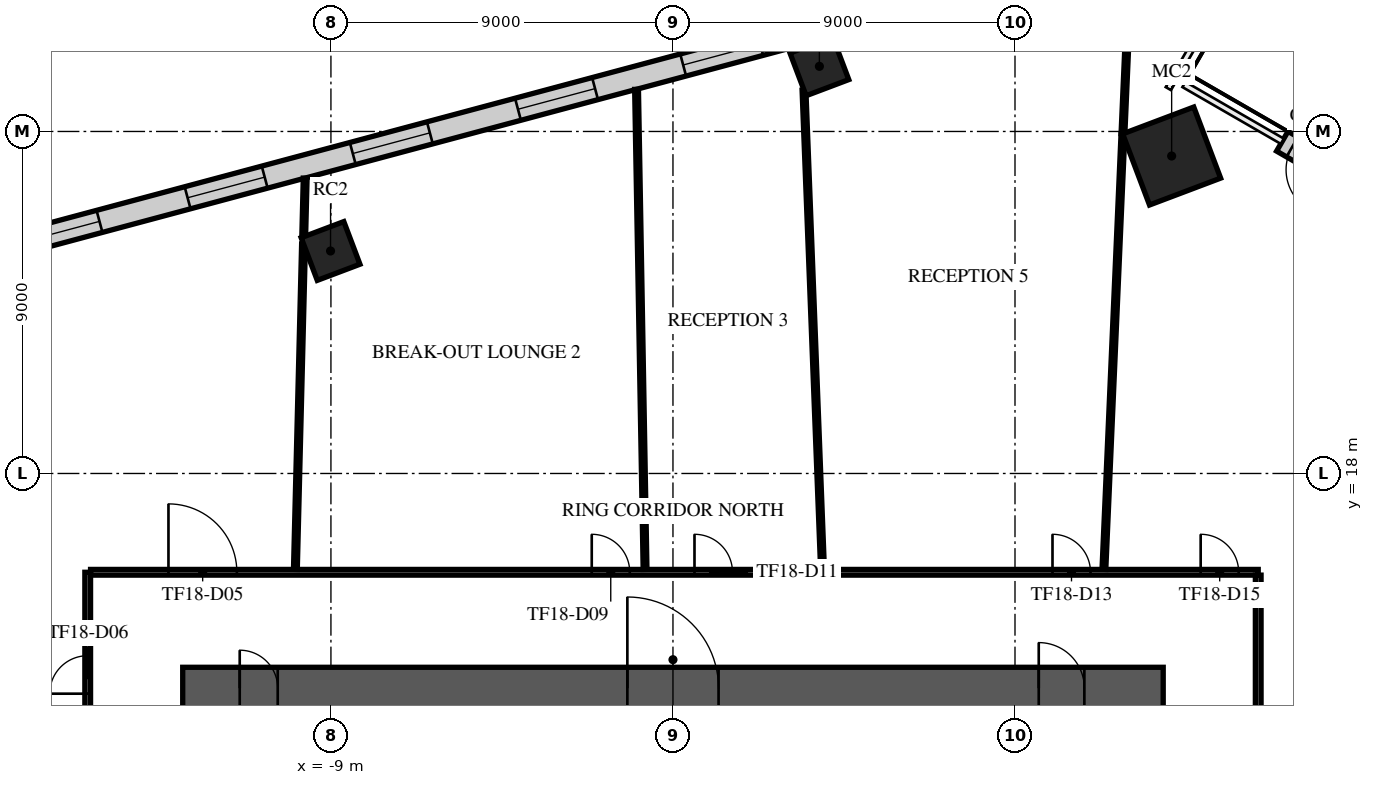
"""IFC4 building model, lengths in metres.
Left out: names, types, materials, properties, quantities, classifications, styles, units other than length and angle.
Written with IfcOpenShell. Run it as: python <this file> out.ifc"""

import sys

from ifc_helpers import new_model, si_unit, direction, frame, frame_2d, origin, origin_2d, place, context, subcontext, project, spatial, rectangle, extrude, element, fill, save


model = new_model("IFC4")
c1 = context("Model", 3, precision=1e-05, world=origin(), true_north=direction((0.0, 1.0)))
c2 = subcontext(c1, "Body", "Model", "MODEL_VIEW")
j1 = project(units=[si_unit("LENGTHUNIT", "METRE"), si_unit("PLANEANGLEUNIT", "RADIAN")], contexts=[c1])
p1 = place(None, origin())
s1 = spatial("IfcSite", under=j1, at=p1, CompositionType="ELEMENT")
p2 = place(p1, origin())
s2 = spatial("IfcBuilding", under=s1, at=p2, CompositionType="ELEMENT")
p3 = place(p2, frame((0.0, 0.0, 82.1)))
s3 = spatial("IfcBuildingStorey", under=s2, at=p3, CompositionType="ELEMENT", Elevation=82.1)
p4 = place(p3, frame((13.122, 26.354, -0.42), z_axis=(0.0, 0.0, 1.0), x_axis=(0.935491525991, 0.353349125935, 0.0)))
e1 = element("IfcColumn", 1, at=p4, inside=s3, PredefinedType="COLUMN", context=c2, shape_type="SweptSolid", body=[
    extrude(rectangle(XDim=2.0, YDim=2.0, at=origin_2d()), origin(), (0.0, 0.0, 1.0), 4.42),
])
for number, where, z_axis, x_axis in (
    (2, (3.853, 28.714, -0.42), (0.0, 0.0, 1.0), (0.935, 0.353, 0.0)),
    (3, (-9.01, 23.855, -0.42), (0.0, 0.0, 1.0), (0.935, 0.353, 0.0)),
):
    element("IfcColumn", number, at=place(p3, frame(where, z_axis=z_axis, x_axis=x_axis)), inside=s3, PredefinedType="COLUMN", context=c2, shape_type="SweptSolid", body=[
        extrude(rectangle(XDim=1.2, YDim=1.2, at=origin_2d()), origin(), (0.0, 0.0, 1.0), 4.42),
    ])
p5 = place(p3, frame((-12.9, 12.35, 0.0), z_axis=(0.0, 0.0, 1.0), x_axis=(1.0, 0.0, 0.0)))
e4 = element("IfcWall", 4, at=p5, inside=s3, PredefinedType="SHEAR", context=c2, shape_type="SweptSolid", body=[
    extrude(rectangle(XDim=25.8, YDim=1.1, at=frame_2d((12.9, 0.0))), origin(), (0.0, 0.0, 1.0), 3.58),
])
p6 = place(p5, frame((11.7, 0.0, 0.0)))
e5 = element("IfcOpeningElement", 5, at=p6, cuts=e4, PredefinedType="OPENING", context=c2, shape_type="SweptSolid", body=[
    extrude(rectangle(XDim=2.4, YDim=2.4, at=frame_2d((1.2, 1.2))), frame((0.0, 0.56, 0.0), z_axis=(0.0, -1.0, 0.0), x_axis=(1.0, 0.0, 0.0)), (0.0, 0.0, 1.0), 1.12),
])
p7 = place(p5, frame((22.525, 0.0, 0.0)))
e6 = element("IfcOpeningElement", 6, at=p7, cuts=e4, PredefinedType="OPENING", context=c2, shape_type="SweptSolid", body=[
    extrude(rectangle(XDim=1.2, YDim=2.1, at=frame_2d((0.6, 1.05))), frame((0.0, 0.56, 0.0), z_axis=(0.0, -1.0, 0.0), x_axis=(1.0, 0.0, 0.0)), (0.0, 0.0, 1.0), 1.12),
])
p8 = place(p5, frame((1.5, 0.0, 0.0)))
e7 = element("IfcOpeningElement", 7, at=p8, cuts=e4, PredefinedType="OPENING", context=c2, shape_type="SweptSolid", body=[
    extrude(rectangle(XDim=1.0, YDim=2.1, at=frame_2d((0.5, 1.05))), frame((0.0, 0.56, 0.0), z_axis=(0.0, -1.0, 0.0), x_axis=(1.0, 0.0, 0.0)), (0.0, 0.0, 1.0), 1.12),
])
p9 = place(p3, frame((16.496, 33.097, 0.0), z_axis=(0.0, 0.0, 1.0), x_axis=(-0.965926333894, -0.258817150689, 0.0)))
e8 = element("IfcWall", 8, at=p9, inside=s3, PredefinedType="STANDARD", context=c2, shape_type="SweptSolid", body=[
    extrude(rectangle(XDim=49.376, YDim=0.6, at=frame_2d((24.688, 0.0))), origin(), (0.0, 0.0, 1.0), 3.58),
])
p10 = place(p9, frame((1.2, 0.0, 0.9)))
e9 = element("IfcOpeningElement", 9, at=p10, cuts=e8, PredefinedType="OPENING", context=c2, shape_type="SweptSolid", body=[
    extrude(rectangle(XDim=2.1, YDim=2.1, at=frame_2d((1.05, 1.05))), frame((0.0, 0.31, 0.0), z_axis=(0.0, -1.0, 0.0), x_axis=(1.0, 0.0, 0.0)), (0.0, 0.0, 1.0), 0.62),
])
p11 = place(p9, frame((5.7, 0.0, 0.9)))
e10 = element("IfcOpeningElement", 10, at=p11, cuts=e8, PredefinedType="OPENING", context=c2, shape_type="SweptSolid", body=[
    extrude(rectangle(XDim=2.1, YDim=2.1, at=frame_2d((1.05, 1.05))), frame((0.0, 0.31, 0.0), z_axis=(0.0, -1.0, 0.0), x_axis=(1.0, 0.0, 0.0)), (0.0, 0.0, 1.0), 0.62),
])
p12 = place(p9, frame((10.2, 0.0, 0.9)))
e11 = element("IfcOpeningElement", 11, at=p12, cuts=e8, PredefinedType="OPENING", context=c2, shape_type="SweptSolid", body=[
    extrude(rectangle(XDim=2.1, YDim=2.1, at=frame_2d((1.05, 1.05))), frame((0.0, 0.31, 0.0), z_axis=(0.0, -1.0, 0.0), x_axis=(1.0, 0.0, 0.0)), (0.0, 0.0, 1.0), 0.62),
])
p13 = place(p9, frame((14.7, 0.0, 0.9)))
e12 = element("IfcOpeningElement", 12, at=p13, cuts=e8, PredefinedType="OPENING", context=c2, shape_type="SweptSolid", body=[
    extrude(rectangle(XDim=2.1, YDim=2.1, at=frame_2d((1.05, 1.05))), frame((0.0, 0.31, 0.0), z_axis=(0.0, -1.0, 0.0), x_axis=(1.0, 0.0, 0.0)), (0.0, 0.0, 1.0), 0.62),
])
p14 = place(p9, frame((19.2, 0.0, 0.9)))
e13 = element("IfcOpeningElement", 13, at=p14, cuts=e8, PredefinedType="OPENING", context=c2, shape_type="SweptSolid", body=[
    extrude(rectangle(XDim=2.1, YDim=2.1, at=frame_2d((1.05, 1.05))), frame((0.0, 0.31, 0.0), z_axis=(0.0, -1.0, 0.0), x_axis=(1.0, 0.0, 0.0)), (0.0, 0.0, 1.0), 0.62),
])
p15 = place(p9, frame((23.7, 0.0, 0.9)))
e14 = element("IfcOpeningElement", 14, at=p15, cuts=e8, PredefinedType="OPENING", context=c2, shape_type="SweptSolid", body=[
    extrude(rectangle(XDim=2.1, YDim=2.1, at=frame_2d((1.05, 1.05))), frame((0.0, 0.31, 0.0), z_axis=(0.0, -1.0, 0.0), x_axis=(1.0, 0.0, 0.0)), (0.0, 0.0, 1.0), 0.62),
])
p16 = place(p9, frame((28.2, 0.0, 0.9)))
e15 = element("IfcOpeningElement", 15, at=p16, cuts=e8, PredefinedType="OPENING", context=c2, shape_type="SweptSolid", body=[
    extrude(rectangle(XDim=2.1, YDim=2.1, at=frame_2d((1.05, 1.05))), frame((0.0, 0.31, 0.0), z_axis=(0.0, -1.0, 0.0), x_axis=(1.0, 0.0, 0.0)), (0.0, 0.0, 1.0), 0.62),
])
p17 = place(p9, frame((32.7, 0.0, 0.9)))
e16 = element("IfcOpeningElement", 16, at=p17, cuts=e8, PredefinedType="OPENING", context=c2, shape_type="SweptSolid", body=[
    extrude(rectangle(XDim=2.1, YDim=2.1, at=frame_2d((1.05, 1.05))), frame((0.0, 0.31, 0.0), z_axis=(0.0, -1.0, 0.0), x_axis=(1.0, 0.0, 0.0)), (0.0, 0.0, 1.0), 0.62),
])
p18 = place(p9, frame((37.2, 0.0, 0.9)))
e17 = element("IfcOpeningElement", 17, at=p18, cuts=e8, PredefinedType="OPENING", context=c2, shape_type="SweptSolid", body=[
    extrude(rectangle(XDim=2.1, YDim=2.1, at=frame_2d((1.05, 1.05))), frame((0.0, 0.31, 0.0), z_axis=(0.0, -1.0, 0.0), x_axis=(1.0, 0.0, 0.0)), (0.0, 0.0, 1.0), 0.62),
])
p19 = place(p9, frame((41.7, 0.0, 0.9)))
e18 = element("IfcOpeningElement", 18, at=p19, cuts=e8, PredefinedType="OPENING", context=c2, shape_type="SweptSolid", body=[
    extrude(rectangle(XDim=2.1, YDim=2.1, at=frame_2d((1.05, 1.05))), frame((0.0, 0.31, 0.0), z_axis=(0.0, -1.0, 0.0), x_axis=(1.0, 0.0, 0.0)), (0.0, 0.0, 1.0), 0.62),
])
p20 = place(p9, frame((46.138, 0.0, 0.9)))
e19 = element("IfcOpeningElement", 19, at=p20, cuts=e8, PredefinedType="OPENING", context=c2, shape_type="SweptSolid", body=[
    extrude(rectangle(XDim=2.1, YDim=2.1, at=frame_2d((1.05, 1.05))), frame((0.0, 0.31, 0.0), z_axis=(0.0, -1.0, 0.0), x_axis=(1.0, 0.0, 0.0)), (0.0, 0.0, 1.0), 0.62),
])
p21 = place(p3, frame((17.593, 25.843, 0.0), z_axis=(0.0, 0.0, 1.0), x_axis=(-0.866047807691, 0.499961193289, 0.0)))
e20 = element("IfcWall", 20, at=p21, inside=s3, PredefinedType="STANDARD", context=c2, shape_type="SweptSolid", body=[
    extrude(rectangle(XDim=1.8, YDim=0.6, at=frame_2d((0.9, 0.0))), origin(), (0.0, 0.0, 1.0), 3.58),
])
p22 = place(p21, frame((0.3, 0.0, 0.0)))
e21 = element("IfcOpeningElement", 21, at=p22, cuts=e20, PredefinedType="OPENING", context=c2, shape_type="SweptSolid", body=[
    extrude(rectangle(XDim=1.2, YDim=2.4, at=frame_2d((0.6, 1.2))), frame((0.0, 0.31, 0.0), z_axis=(0.0, -1.0, 0.0), x_axis=(1.0, 0.0, 0.0)), (0.0, 0.0, 1.0), 0.62),
])
p23 = place(p3, frame((-15.4, -15.4, 0.0), z_axis=(0.0, 0.0, 1.0), x_axis=(0.0, 1.0, 0.0)))
e22 = element("IfcWall", 22, at=p23, inside=s3, PredefinedType="PARTITIONING", context=c2, shape_type="SweptSolid", body=[
    extrude(rectangle(XDim=30.8, YDim=0.15, at=frame_2d((15.4, 0.0))), origin(), (0.0, 0.0, 1.0), 3.08),
])
p24 = place(p23, frame((21.677, 0.0, 0.0)))
e23 = element("IfcOpeningElement", 23, at=p24, cuts=e22, PredefinedType="OPENING", context=c2, shape_type="SweptSolid", body=[
    extrude(rectangle(XDim=1.8, YDim=2.1, at=frame_2d((0.9, 1.05))), frame((0.0, 0.085, 0.0), z_axis=(0.0, -1.0, 0.0), x_axis=(1.0, 0.0, 0.0)), (0.0, 0.0, 1.0), 0.17),
])
p25 = place(p23, frame((17.927, 0.0, 0.0)))
e24 = element("IfcOpeningElement", 24, at=p25, cuts=e22, PredefinedType="OPENING", context=c2, shape_type="SweptSolid", body=[
    extrude(rectangle(XDim=1.0, YDim=2.1, at=frame_2d((0.5, 1.05))), frame((0.0, 0.085, 0.0), z_axis=(0.0, -1.0, 0.0), x_axis=(1.0, 0.0, 0.0)), (0.0, 0.0, 1.0), 0.17),
])
p26 = place(p23, frame((15.322, 0.0, 0.0)))
e25 = element("IfcOpeningElement", 25, at=p26, cuts=e22, PredefinedType="OPENING", context=c2, shape_type="SweptSolid", body=[
    extrude(rectangle(XDim=1.0, YDim=2.1, at=frame_2d((0.5, 1.05))), frame((0.0, 0.085, 0.0), z_axis=(0.0, -1.0, 0.0), x_axis=(1.0, 0.0, 0.0)), (0.0, 0.0, 1.0), 0.17),
])
p27 = place(p23, frame((6.348, 0.0, 0.0)))
e26 = element("IfcOpeningElement", 26, at=p27, cuts=e22, PredefinedType="OPENING", context=c2, shape_type="SweptSolid", body=[
    extrude(rectangle(XDim=1.0, YDim=2.1, at=frame_2d((0.5, 1.05))), frame((0.0, 0.085, 0.0), z_axis=(0.0, -1.0, 0.0), x_axis=(1.0, 0.0, 0.0)), (0.0, 0.0, 1.0), 0.17),
])
p28 = place(p23, frame((27.605, 0.0, 0.0)))
e27 = element("IfcOpeningElement", 27, at=p28, cuts=e22, PredefinedType="OPENING", context=c2, shape_type="SweptSolid", body=[
    extrude(rectangle(XDim=1.0, YDim=2.1, at=frame_2d((0.5, 1.05))), frame((0.0, 0.085, 0.0), z_axis=(0.0, -1.0, 0.0), x_axis=(1.0, 0.0, 0.0)), (0.0, 0.0, 1.0), 0.17),
])
p29 = place(p23, frame((2.8, 0.0, 0.0)))
e28 = element("IfcOpeningElement", 28, at=p29, cuts=e22, PredefinedType="OPENING", context=c2, shape_type="SweptSolid", body=[
    extrude(rectangle(XDim=1.0, YDim=2.1, at=frame_2d((0.5, 1.05))), frame((0.0, 0.085, 0.0), z_axis=(0.0, -1.0, 0.0), x_axis=(1.0, 0.0, 0.0)), (0.0, 0.0, 1.0), 0.17),
])
p30 = place(p3, frame((-15.325, 15.4, 0.0), z_axis=(0.0, 0.0, 1.0), x_axis=(1.0, 0.0, 0.0)))
e29 = element("IfcWall", 29, at=p30, inside=s3, PredefinedType="PARTITIONING", context=c2, shape_type="SweptSolid", body=[
    extrude(rectangle(XDim=30.725, YDim=0.15, at=frame_2d((15.362, 0.0))), origin(), (0.0, 0.0, 1.0), 3.08),
])
p31 = place(p30, frame((2.05, 0.0, 0.0)))
e30 = element("IfcOpeningElement", 30, at=p31, cuts=e29, PredefinedType="OPENING", context=c2, shape_type="SweptSolid", body=[
    extrude(rectangle(XDim=1.8, YDim=2.1, at=frame_2d((0.9, 1.05))), frame((0.0, 0.085, 0.0), z_axis=(0.0, -1.0, 0.0), x_axis=(1.0, 0.0, 0.0)), (0.0, 0.0, 1.0), 0.17),
])
p32 = place(p30, frame((13.188, 0.0, 0.0)))
e31 = element("IfcOpeningElement", 31, at=p32, cuts=e29, PredefinedType="OPENING", context=c2, shape_type="SweptSolid", body=[
    extrude(rectangle(XDim=1.0, YDim=2.1, at=frame_2d((0.5, 1.05))), frame((0.0, 0.085, 0.0), z_axis=(0.0, -1.0, 0.0), x_axis=(1.0, 0.0, 0.0)), (0.0, 0.0, 1.0), 0.17),
])
p33 = place(p30, frame((15.892, 0.0, 0.0)))
e32 = element("IfcOpeningElement", 32, at=p33, cuts=e29, PredefinedType="OPENING", context=c2, shape_type="SweptSolid", body=[
    extrude(rectangle(XDim=1.0, YDim=2.1, at=frame_2d((0.5, 1.05))), frame((0.0, 0.085, 0.0), z_axis=(0.0, -1.0, 0.0), x_axis=(1.0, 0.0, 0.0)), (0.0, 0.0, 1.0), 0.17),
])
p34 = place(p30, frame((25.312, 0.0, 0.0)))
e33 = element("IfcOpeningElement", 33, at=p34, cuts=e29, PredefinedType="OPENING", context=c2, shape_type="SweptSolid", body=[
    extrude(rectangle(XDim=1.0, YDim=2.1, at=frame_2d((0.5, 1.05))), frame((0.0, 0.085, 0.0), z_axis=(0.0, -1.0, 0.0), x_axis=(1.0, 0.0, 0.0)), (0.0, 0.0, 1.0), 0.17),
])
p35 = place(p30, frame((29.211, 0.0, 0.0)))
e34 = element("IfcOpeningElement", 34, at=p35, cuts=e29, PredefinedType="OPENING", context=c2, shape_type="SweptSolid", body=[
    extrude(rectangle(XDim=1.0, YDim=2.1, at=frame_2d((0.5, 1.05))), frame((0.0, 0.085, 0.0), z_axis=(0.0, -1.0, 0.0), x_axis=(1.0, 0.0, 0.0)), (0.0, 0.0, 1.0), 0.17),
])
p36 = place(p3, frame((15.4, -15.325, 0.0), z_axis=(0.0, 0.0, 1.0), x_axis=(0.0, 1.0, 0.0)))
e35 = element("IfcWall", 35, at=p36, inside=s3, PredefinedType="PARTITIONING", context=c2, shape_type="SweptSolid", body=[
    extrude(rectangle(XDim=30.65, YDim=0.15, at=frame_2d((15.325, 0.0))), origin(), (0.0, 0.0, 1.0), 3.08),
])
p37 = place(p36, frame((24.14, 0.0, 0.0)))
e36 = element("IfcOpeningElement", 36, at=p37, cuts=e35, PredefinedType="OPENING", context=c2, shape_type="SweptSolid", body=[
    extrude(rectangle(XDim=1.8, YDim=2.1, at=frame_2d((0.9, 1.05))), frame((0.0, 0.085, 0.0), z_axis=(0.0, -1.0, 0.0), x_axis=(1.0, 0.0, 0.0)), (0.0, 0.0, 1.0), 0.17),
])
p38 = place(p36, frame((3.3, 0.0, 0.0)))
e37 = element("IfcOpeningElement", 37, at=p38, cuts=e35, PredefinedType="OPENING", context=c2, shape_type="SweptSolid", body=[
    extrude(rectangle(XDim=1.8, YDim=2.1, at=frame_2d((0.9, 1.05))), frame((0.0, 0.085, 0.0), z_axis=(0.0, -1.0, 0.0), x_axis=(1.0, 0.0, 0.0)), (0.0, 0.0, 1.0), 0.17),
])
p39 = place(p36, frame((19.191, 0.0, 0.0)))
e38 = element("IfcOpeningElement", 38, at=p39, cuts=e35, PredefinedType="OPENING", context=c2, shape_type="SweptSolid", body=[
    extrude(rectangle(XDim=1.0, YDim=2.1, at=frame_2d((0.5, 1.05))), frame((0.0, 0.085, 0.0), z_axis=(0.0, -1.0, 0.0), x_axis=(1.0, 0.0, 0.0)), (0.0, 0.0, 1.0), 0.17),
])
p40 = place(p36, frame((10.963, 0.0, 0.0)))
e39 = element("IfcOpeningElement", 39, at=p40, cuts=e35, PredefinedType="OPENING", context=c2, shape_type="SweptSolid", body=[
    extrude(rectangle(XDim=1.0, YDim=2.1, at=frame_2d((0.5, 1.05))), frame((0.0, 0.085, 0.0), z_axis=(0.0, -1.0, 0.0), x_axis=(1.0, 0.0, 0.0)), (0.0, 0.0, 1.0), 0.17),
])
p41 = place(p3, frame((-9.935, 15.476, 0.0), z_axis=(0.0, 0.0, 1.0), x_axis=(0.024996463825, 0.999687539582, 0.0)))
e40 = element("IfcWall", 40, at=p41, inside=s3, PredefinedType="PARTITIONING", context=c2, shape_type="SweptSolid", body=[
    extrude(rectangle(XDim=8.566, YDim=0.1, at=frame_2d((4.283, 0.0))), origin(), (0.0, 0.0, 1.0), 3.58),
])
p42 = place(p3, frame((-9.716, 24.229, 0.0), z_axis=(0.0, 0.0, 1.0), x_axis=(0.025011966744, 0.999687151823, 0.0)))
e41 = element("IfcWall", 41, at=p42, inside=s3, PredefinedType="PARTITIONING", context=c2, shape_type="SweptSolid", body=[
    extrude(rectangle(XDim=1.542, YDim=0.1, at=frame_2d((0.771, 0.0))), origin(), (0.0, 0.0, 1.0), 3.58),
])
p43 = place(p3, frame((-0.958, 28.108, 0.0), z_axis=(0.0, 0.0, 1.0), x_axis=(0.017700788333, -0.999843328773, 0.0)))
e42 = element("IfcWall", 42, at=p43, inside=s3, PredefinedType="PARTITIONING", context=c2, shape_type="SweptSolid", body=[
    extrude(rectangle(XDim=12.634, YDim=0.1, at=frame_2d((6.317, 0.0))), origin(), (0.0, 0.0, 1.0), 3.58),
])
p44 = place(p3, frame((3.448, 28.089, 0.0), z_axis=(0.0, 0.0, 1.0), x_axis=(0.038608436219, -0.999254416379, 0.0)))
e43 = element("IfcWall", 43, at=p44, inside=s3, PredefinedType="PARTITIONING", context=c2, shape_type="SweptSolid", body=[
    extrude(rectangle(XDim=12.622, YDim=0.1, at=frame_2d((6.311, 0.0))), origin(), (0.0, 0.0, 1.0), 2.96),
])
p45 = place(p3, frame((11.339, 15.477, 0.0), z_axis=(0.0, 0.0, 1.0), x_axis=(0.04370366829, 0.999044538235, 0.0)))
e44 = element("IfcWall", 44, at=p45, inside=s3, PredefinedType="PARTITIONING", context=c2, shape_type="SweptSolid", body=[
    extrude(rectangle(XDim=11.452, YDim=0.1, at=frame_2d((5.726, 0.0))), origin(), (0.0, 0.0, 1.0), 3.58),
])
p46 = place(p3, frame((11.841, 26.939, 0.0), z_axis=(0.0, 0.0, 1.0), x_axis=(0.04372159787, 0.999043753736, 0.0)))
e45 = element("IfcWall", 45, at=p46, inside=s3, PredefinedType="PARTITIONING", context=c2, shape_type="SweptSolid", body=[
    extrude(rectangle(XDim=4.657, YDim=0.1, at=frame_2d((2.329, 0.0))), origin(), (0.0, 0.0, 1.0), 3.58),
])
p47 = place(p6, origin())
e46 = element("IfcDoor", 46, at=p47, inside=s3, OperationType="SINGLE_SWING_LEFT", PredefinedType="DOOR", context=c2, shape_type="SweptSolid", body=[
    extrude(rectangle(XDim=2.4, YDim=2.4, at=frame_2d((1.2, 1.2))), frame((0.0, 0.025, 0.0), z_axis=(0.0, -1.0, 0.0), x_axis=(1.0, 0.0, 0.0)), (0.0, 0.0, 1.0), 0.05),
])
fill(e5, e46)
p48 = place(p7, origin())
e47 = element("IfcDoor", 47, at=p48, inside=s3, OperationType="SINGLE_SWING_LEFT", PredefinedType="DOOR", context=c2, shape_type="SweptSolid", body=[
    extrude(rectangle(XDim=1.2, YDim=2.1, at=frame_2d((0.6, 1.05))), frame((0.0, 0.025, 0.0), z_axis=(0.0, -1.0, 0.0), x_axis=(1.0, 0.0, 0.0)), (0.0, 0.0, 1.0), 0.05),
])
fill(e6, e47)
p49 = place(p8, origin())
e48 = element("IfcDoor", 48, at=p49, inside=s3, OperationType="SINGLE_SWING_LEFT", PredefinedType="DOOR", context=c2, shape_type="SweptSolid", body=[
    extrude(rectangle(XDim=1.0, YDim=2.1, at=frame_2d((0.5, 1.05))), frame((0.0, 0.025, 0.0), z_axis=(0.0, -1.0, 0.0), x_axis=(1.0, 0.0, 0.0)), (0.0, 0.0, 1.0), 0.05),
])
fill(e7, e48)
p50 = place(p13, origin())
e49 = element("IfcWindow", 49, at=p50, inside=s3, PartitioningType="SINGLE_PANEL", PredefinedType="WINDOW", context=c2, shape_type="SweptSolid", body=[
    extrude(rectangle(XDim=2.1, YDim=2.1, at=frame_2d((1.05, 1.05))), frame((0.0, 0.03, 0.0), z_axis=(0.0, -1.0, 0.0), x_axis=(1.0, 0.0, 0.0)), (0.0, 0.0, 1.0), 0.06),
])
fill(e12, e49)
p51 = place(p14, origin())
e50 = element("IfcWindow", 50, at=p51, inside=s3, PartitioningType="SINGLE_PANEL", PredefinedType="WINDOW", context=c2, shape_type="SweptSolid", body=[
    extrude(rectangle(XDim=2.1, YDim=2.1, at=frame_2d((1.05, 1.05))), frame((0.0, 0.03, 0.0), z_axis=(0.0, -1.0, 0.0), x_axis=(1.0, 0.0, 0.0)), (0.0, 0.0, 1.0), 0.06),
])
fill(e13, e50)
p52 = place(p15, origin())
e51 = element("IfcWindow", 51, at=p52, inside=s3, PartitioningType="SINGLE_PANEL", PredefinedType="WINDOW", context=c2, shape_type="SweptSolid", body=[
    extrude(rectangle(XDim=2.1, YDim=2.1, at=frame_2d((1.05, 1.05))), frame((0.0, 0.03, 0.0), z_axis=(0.0, -1.0, 0.0), x_axis=(1.0, 0.0, 0.0)), (0.0, 0.0, 1.0), 0.06),
])
fill(e14, e51)
p53 = place(p16, origin())
e52 = element("IfcWindow", 52, at=p53, inside=s3, PartitioningType="SINGLE_PANEL", PredefinedType="WINDOW", context=c2, shape_type="SweptSolid", body=[
    extrude(rectangle(XDim=2.1, YDim=2.1, at=frame_2d((1.05, 1.05))), frame((0.0, 0.03, 0.0), z_axis=(0.0, -1.0, 0.0), x_axis=(1.0, 0.0, 0.0)), (0.0, 0.0, 1.0), 0.06),
])
fill(e15, e52)
p54 = place(p17, origin())
e53 = element("IfcWindow", 53, at=p54, inside=s3, PartitioningType="SINGLE_PANEL", PredefinedType="WINDOW", context=c2, shape_type="SweptSolid", body=[
    extrude(rectangle(XDim=2.1, YDim=2.1, at=frame_2d((1.05, 1.05))), frame((0.0, 0.03, 0.0), z_axis=(0.0, -1.0, 0.0), x_axis=(1.0, 0.0, 0.0)), (0.0, 0.0, 1.0), 0.06),
])
fill(e16, e53)
p55 = place(p22, origin())
e54 = element("IfcDoor", 54, at=p55, inside=s3, OperationType="SINGLE_SWING_LEFT", PredefinedType="DOOR", context=c2, shape_type="SweptSolid", body=[
    extrude(rectangle(XDim=1.2, YDim=2.4, at=frame_2d((0.6, 1.2))), frame((0.0, 0.025, 0.0), z_axis=(0.0, -1.0, 0.0), x_axis=(1.0, 0.0, 0.0)), (0.0, 0.0, 1.0), 0.05),
])
fill(e21, e54)
p56 = place(p31, origin())
e55 = element("IfcDoor", 55, at=p56, inside=s3, OperationType="DOUBLE_DOOR_SINGLE_SWING", PredefinedType="DOOR", context=c2, shape_type="SweptSolid", body=[
    extrude(rectangle(XDim=1.8, YDim=2.1, at=frame_2d((0.9, 1.05))), frame((0.0, 0.025, 0.0), z_axis=(0.0, -1.0, 0.0), x_axis=(1.0, 0.0, 0.0)), (0.0, 0.0, 1.0), 0.05),
])
fill(e30, e55)
p57 = place(p28, origin())
e56 = element("IfcDoor", 56, at=p57, inside=s3, OperationType="SINGLE_SWING_RIGHT", PredefinedType="DOOR", context=c2, shape_type="SweptSolid", body=[
    extrude(rectangle(XDim=1.0, YDim=2.1, at=frame_2d((0.5, 1.05))), frame((0.0, 0.025, 0.0), z_axis=(0.0, -1.0, 0.0), x_axis=(1.0, 0.0, 0.0)), (0.0, 0.0, 1.0), 0.05),
])
fill(e27, e56)
p58 = place(p32, origin())
e57 = element("IfcDoor", 57, at=p58, inside=s3, OperationType="SINGLE_SWING_RIGHT", PredefinedType="DOOR", context=c2, shape_type="SweptSolid", body=[
    extrude(rectangle(XDim=1.0, YDim=2.1, at=frame_2d((0.5, 1.05))), frame((0.0, 0.025, 0.0), z_axis=(0.0, -1.0, 0.0), x_axis=(1.0, 0.0, 0.0)), (0.0, 0.0, 1.0), 0.05),
])
fill(e31, e57)
p59 = place(p33, origin())
e58 = element("IfcDoor", 58, at=p59, inside=s3, OperationType="SINGLE_SWING_LEFT", PredefinedType="DOOR", context=c2, shape_type="SweptSolid", body=[
    extrude(rectangle(XDim=1.0, YDim=2.1, at=frame_2d((0.5, 1.05))), frame((0.0, 0.025, 0.0), z_axis=(0.0, -1.0, 0.0), x_axis=(1.0, 0.0, 0.0)), (0.0, 0.0, 1.0), 0.05),
])
fill(e32, e58)
p60 = place(p34, origin())
e59 = element("IfcDoor", 59, at=p60, inside=s3, OperationType="SINGLE_SWING_RIGHT", PredefinedType="DOOR", context=c2, shape_type="SweptSolid", body=[
    extrude(rectangle(XDim=1.0, YDim=2.1, at=frame_2d((0.5, 1.05))), frame((0.0, 0.025, 0.0), z_axis=(0.0, -1.0, 0.0), x_axis=(1.0, 0.0, 0.0)), (0.0, 0.0, 1.0), 0.05),
])
fill(e33, e59)
p61 = place(p35, origin())
e60 = element("IfcDoor", 60, at=p61, inside=s3, OperationType="SINGLE_SWING_LEFT", PredefinedType="DOOR", context=c2, shape_type="SweptSolid", body=[
    extrude(rectangle(XDim=1.0, YDim=2.1, at=frame_2d((0.5, 1.05))), frame((0.0, 0.025, 0.0), z_axis=(0.0, -1.0, 0.0), x_axis=(1.0, 0.0, 0.0)), (0.0, 0.0, 1.0), 0.05),
])
fill(e34, e60)
save(model, sys.argv[1])
